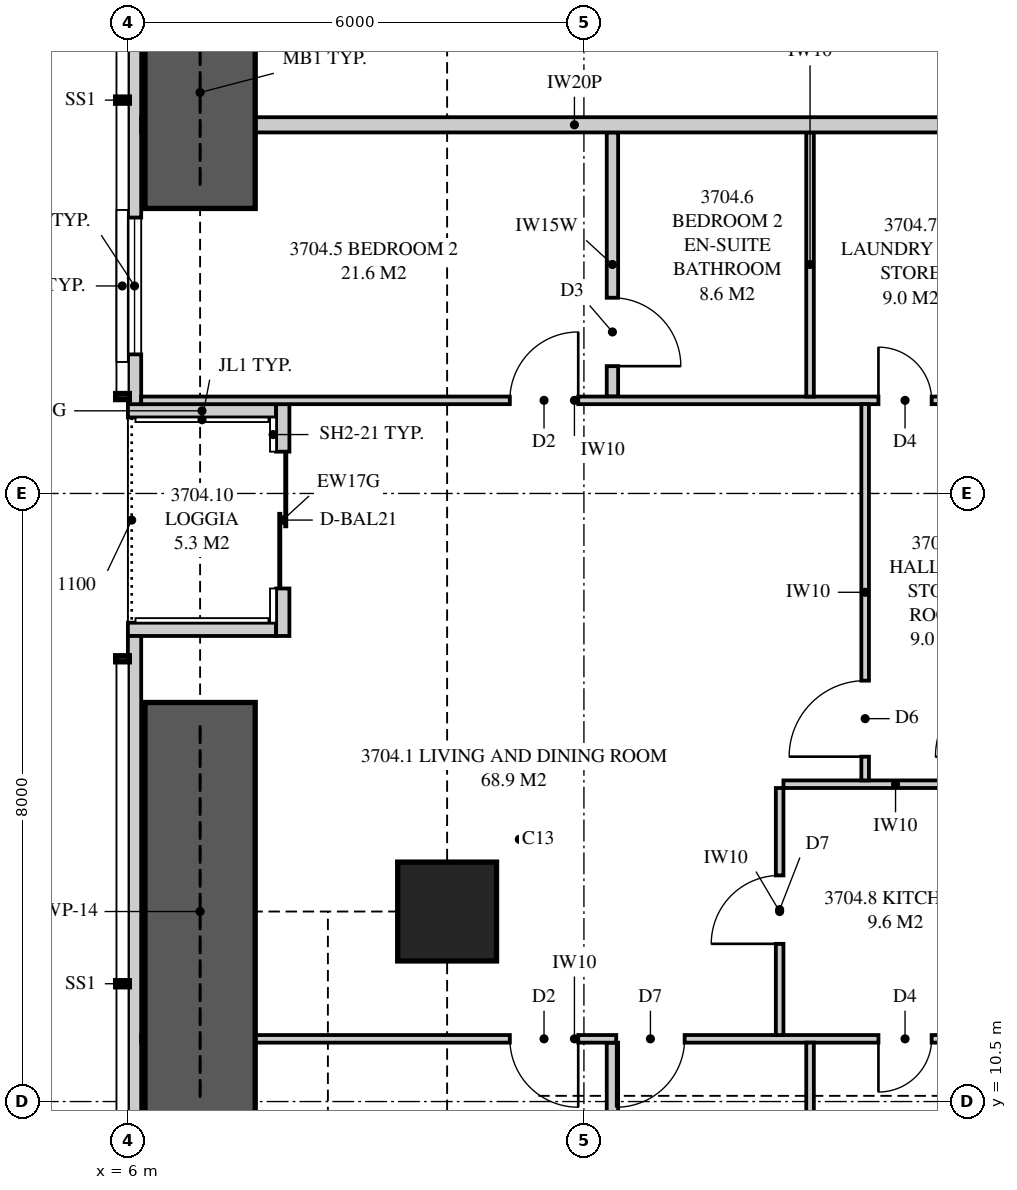
"""IFC4 building model, lengths in metres.
Left out: names, types, materials, properties, quantities, classifications, styles, units other than length and angle.
Written with IfcOpenShell. Run it as: python <this file> out.ifc"""

import sys

from ifc_helpers import new_model, si_unit, direction, frame, frame_2d, origin, origin_2d, place, context, subcontext, project, spatial, polyline, rectangle, outline, extrude, element, fill, save


model = new_model("IFC4")
c1 = context("Model", 3, precision=1e-05, world=origin(), true_north=direction((0.0, 1.0)))
c2 = subcontext(c1, "Body", "Model", "MODEL_VIEW")
j1 = project(units=[si_unit("LENGTHUNIT", "METRE"), si_unit("PLANEANGLEUNIT", "RADIAN")], contexts=[c1])
p1 = place(None, origin())
s1 = spatial("IfcSite", under=j1, at=p1, CompositionType="ELEMENT")
p2 = place(p1, origin())
s2 = spatial("IfcBuilding", under=s1, at=p2, CompositionType="ELEMENT")
p3 = place(p2, frame((0.0, 0.0, 135.0)))
s3 = spatial("IfcBuildingStorey", under=s2, at=p3, CompositionType="ELEMENT", Elevation=135.0)
p4 = place(p3, frame((10.2, 13.0, 0.0), z_axis=(0.0, 0.0, 1.0), x_axis=(1.0, 0.0, 0.0)))
e1 = element("IfcColumn", 1, at=p4, inside=s3, PredefinedType="COLUMN", context=c2, shape_type="SweptSolid", body=[
    extrude(rectangle(XDim=1.3, YDim=1.3, at=origin_2d()), origin(), (0.0, 0.0, 1.0), 3.35),
])
p5 = place(p3, frame((6.087, 34.949, 0.0), z_axis=(0.0, 0.0, 1.0), x_axis=(0.0, -1.0, 0.0)))
e2 = element("IfcWall", 2, at=p5, inside=s3, PredefinedType="SOLIDWALL", context=c2, shape_type="SweptSolid", body=[
    extrude(outline(polyline([(0.0, 0.0), (15.274, 0.0), (15.274, 2.15), (9.949, 2.15), (9.949, 3.11), (9.823, 3.11), (9.823, 2.15), (9.73, 2.15), (9.73, 3.11), (0.0, 3.11), (0.0, 0.0)])), frame((0.0, 0.087, 0.0), z_axis=(0.0, -1.0, 0.0), x_axis=(1.0, 0.0, 0.0)), (0.0, 0.0, 1.0), 0.175),
])
p6 = place(p5, frame((2.618, 0.0, 0.4)))
e3 = element("IfcOpeningElement", 3, at=p6, cuts=e2, PredefinedType="OPENING", context=c2, shape_type="SweptSolid", body=[
    extrude(rectangle(XDim=1.8, YDim=1.7, at=frame_2d((0.9, 0.85))), frame((0.0, 0.097, 0.0), z_axis=(0.0, -1.0, 0.0), x_axis=(1.0, 0.0, 0.0)), (0.0, 0.0, 1.0), 0.195),
])
p7 = place(p5, frame((5.874, 0.0, 0.4)))
e4 = element("IfcOpeningElement", 4, at=p7, cuts=e2, PredefinedType="OPENING", context=c2, shape_type="SweptSolid", body=[
    extrude(rectangle(XDim=1.2, YDim=1.7, at=frame_2d((0.6, 0.85))), frame((0.0, 0.097, 0.0), z_axis=(0.0, -1.0, 0.0), x_axis=(1.0, 0.0, 0.0)), (0.0, 0.0, 1.0), 0.195),
])
p8 = place(p5, frame((12.819, 0.0, 0.4)))
e5 = element("IfcOpeningElement", 5, at=p8, cuts=e2, PredefinedType="OPENING", context=c2, shape_type="SweptSolid", body=[
    extrude(rectangle(XDim=1.8, YDim=1.7, at=frame_2d((0.9, 0.85))), frame((0.0, 0.097, 0.0), z_axis=(0.0, -1.0, 0.0), x_axis=(1.0, 0.0, 0.0)), (0.0, 0.0, 1.0), 0.195),
])
p9 = place(p3, frame((6.087, 16.625, 0.0), z_axis=(0.0, 0.0, 1.0), x_axis=(0.0, -1.0, 0.0)))
e6 = element("IfcWall", 6, at=p9, inside=s3, PredefinedType="SOLIDWALL", context=c2, shape_type="SweptSolid", body=[
    extrude(outline(polyline([(0.0, 0.0), (13.574, 0.0), (13.574, 3.11), (3.844, 3.11), (3.844, 2.15), (3.751, 2.15), (3.751, 3.11), (3.625, 3.11), (3.625, 2.15), (0.0, 2.15), (0.0, 0.0)])), frame((0.0, 0.087, 0.0), z_axis=(0.0, -1.0, 0.0), x_axis=(1.0, 0.0, 0.0)), (0.0, 0.0, 1.0), 0.175),
])
p10 = place(p9, frame((6.5, 0.0, 0.4)))
e7 = element("IfcOpeningElement", 7, at=p10, cuts=e6, PredefinedType="OPENING", context=c2, shape_type="SweptSolid", body=[
    extrude(rectangle(XDim=1.8, YDim=1.7, at=frame_2d((0.9, 0.85))), frame((0.0, 0.097, 0.0), z_axis=(0.0, -1.0, 0.0), x_axis=(1.0, 0.0, 0.0)), (0.0, 0.0, 1.0), 0.195),
])
p11 = place(p9, frame((9.656, 0.0, 0.4)))
e8 = element("IfcOpeningElement", 8, at=p11, cuts=e6, PredefinedType="OPENING", context=c2, shape_type="SweptSolid", body=[
    extrude(rectangle(XDim=1.8, YDim=1.7, at=frame_2d((0.9, 0.85))), frame((0.0, 0.097, 0.0), z_axis=(0.0, -1.0, 0.0), x_axis=(1.0, 0.0, 0.0)), (0.0, 0.0, 1.0), 0.195),
])
p12 = place(p3, frame((8.038, 19.675, 0.0), z_axis=(0.0, 0.0, 1.0), x_axis=(0.0, -1.0, 0.0)))
e9 = element("IfcWall", 9, at=p12, inside=s3, PredefinedType="SOLIDWALL", context=c2, shape_type="SweptSolid", body=[
    extrude(rectangle(XDim=3.05, YDim=0.175, at=frame_2d((1.525, 0.0))), origin(), (0.0, 0.0, 1.0), 3.11),
])
p13 = place(p12, frame((0.625, 0.0, 0.0)))
e10 = element("IfcOpeningElement", 10, at=p13, cuts=e9, PredefinedType="OPENING", context=c2, shape_type="SweptSolid", body=[
    extrude(rectangle(XDim=1.8, YDim=2.1, at=frame_2d((0.9, 1.05))), frame((0.0, 0.097, 0.0), z_axis=(0.0, -1.0, 0.0), x_axis=(1.0, 0.0, 0.0)), (0.0, 0.0, 1.0), 0.195),
])
for number, where, z_axis, x_axis in (
    (11, (6.0, 19.587, 0.0), (0.0, 0.0, 1.0), (1.0, 0.0, 0.0)),
    (12, (6.0, 16.712, 0.0), (0.0, 0.0, 1.0), (1.0, 0.0, 0.0)),
):
    element("IfcWall", number, at=place(p3, frame(where, z_axis=z_axis, x_axis=x_axis)), inside=s3, PredefinedType="SOLIDWALL", context=c2, shape_type="SweptSolid", body=[
        extrude(outline(polyline([(0.0, 0.0), (1.95, 0.0), (1.95, 3.11), (1.75, 3.11), (1.75, 2.15), (0.15, 2.15), (0.15, 3.11), (0.0, 3.11), (0.0, 0.0)])), frame((0.0, 0.087, 0.0), z_axis=(0.0, -1.0, 0.0), x_axis=(1.0, 0.0, 0.0)), (0.0, 0.0, 1.0), 0.175),
    ])
p14 = place(p3, frame((6.175, 23.35, 0.0), z_axis=(0.0, 0.0, 1.0), x_axis=(1.0, 0.0, 0.0)))
e13 = element("IfcWall", 13, at=p14, inside=s3, PredefinedType="PARTITIONING", context=c2, shape_type="SweptSolid", body=[
    extrude(outline(polyline([(0.529, 2.15), (0.0, 2.15), (0.0, 0.0), (0.529, 0.0), (0.529, 0.376), (1.021, 0.376), (1.021, 0.0), (11.4, 0.0), (11.4, 3.11), (5.335, 3.11), (5.335, 2.51), (2.715, 2.51), (2.715, 3.11), (1.685, 3.11), (1.685, 2.15), (1.021, 2.15), (1.021, 1.774), (0.529, 1.774), (0.529, 2.15)])), frame((0.0, 0.1, 0.0), z_axis=(0.0, -1.0, 0.0), x_axis=(1.0, 0.0, 0.0)), (0.0, 0.0, 1.0), 0.2),
])
p15 = place(p3, frame((6.175, 11.325, 0.0), z_axis=(0.0, 0.0, 1.0), x_axis=(1.0, 0.0, 0.0)))
e14 = element("IfcWall", 14, at=p15, inside=s3, PredefinedType="PARTITIONING", context=c2, shape_type="SweptSolid", body=[
    extrude(outline(polyline([(0.175, 3.11), (0.0, 3.11), (0.0, 0.0), (0.529, 0.0), (0.529, 0.325), (1.021, 0.325), (1.021, 0.0), (11.4, 0.0), (11.4, 3.11), (5.285, 3.11), (5.285, 2.51), (2.765, 2.51), (2.765, 3.11), (2.744, 3.11), (2.744, 2.541), (2.169, 2.541), (2.169, 3.11), (1.918, 3.11), (1.918, 2.15), (1.021, 2.15), (1.021, 1.825), (0.529, 1.825), (0.529, 2.15), (0.175, 2.15), (0.175, 3.11)])), frame((0.0, 0.05, 0.0), z_axis=(0.0, -1.0, 0.0), x_axis=(1.0, 0.0, 0.0)), (0.0, 0.0, 1.0), 0.1),
])
p16 = place(p15, frame((4.85, 0.0, 0.0)))
e15 = element("IfcOpeningElement", 15, at=p16, cuts=e14, PredefinedType="OPENING", context=c2, shape_type="SweptSolid", body=[
    extrude(rectangle(XDim=0.9, YDim=2.1, at=frame_2d((0.45, 1.05))), frame((0.0, 0.06, 0.0), z_axis=(0.0, -1.0, 0.0), x_axis=(1.0, 0.0, 0.0)), (0.0, 0.0, 1.0), 0.12),
])
p17 = place(p15, frame((6.25, 0.0, 0.0)))
e16 = element("IfcOpeningElement", 16, at=p17, cuts=e14, PredefinedType="OPENING", context=c2, shape_type="SweptSolid", body=[
    extrude(rectangle(XDim=0.9, YDim=2.1, at=frame_2d((0.45, 1.05))), frame((0.0, 0.06, 0.0), z_axis=(0.0, -1.0, 0.0), x_axis=(1.0, 0.0, 0.0)), (0.0, 0.0, 1.0), 0.12),
])
p18 = place(p15, frame((9.7, 0.0, 0.0)))
e17 = element("IfcOpeningElement", 17, at=p18, cuts=e14, PredefinedType="OPENING", context=c2, shape_type="SweptSolid", body=[
    extrude(rectangle(XDim=0.7, YDim=2.1, at=frame_2d((0.35, 1.05))), frame((0.0, 0.06, 0.0), z_axis=(0.0, -1.0, 0.0), x_axis=(1.0, 0.0, 0.0)), (0.0, 0.0, 1.0), 0.12),
])
p19 = place(p3, frame((6.175, 19.725, 0.0), z_axis=(0.0, 0.0, 1.0), x_axis=(1.0, 0.0, 0.0)))
e18 = element("IfcWall", 18, at=p19, inside=s3, PredefinedType="PARTITIONING", context=c2, shape_type="SweptSolid", body=[
    extrude(outline(polyline([(0.0, 0.0), (11.4, 0.0), (11.4, 3.11), (5.285, 3.11), (5.285, 2.51), (2.765, 2.51), (2.765, 3.11), (1.635, 3.11), (1.635, 2.15), (0.0, 2.15), (0.0, 3.11), (0.0, 0.0)])), frame((0.0, 0.05, 0.0), z_axis=(0.0, -1.0, 0.0), x_axis=(1.0, 0.0, 0.0)), (0.0, 0.0, 1.0), 0.1),
])
p20 = place(p19, frame((4.85, 0.0, 0.0)))
e19 = element("IfcOpeningElement", 19, at=p20, cuts=e18, PredefinedType="OPENING", context=c2, shape_type="SweptSolid", body=[
    extrude(rectangle(XDim=0.9, YDim=2.1, at=frame_2d((0.45, 1.05))), frame((0.0, 0.06, 0.0), z_axis=(0.0, -1.0, 0.0), x_axis=(1.0, 0.0, 0.0)), (0.0, 0.0, 1.0), 0.12),
])
p21 = place(p19, frame((9.7, 0.0, 0.0)))
e20 = element("IfcOpeningElement", 20, at=p21, cuts=e18, PredefinedType="OPENING", context=c2, shape_type="SweptSolid", body=[
    extrude(rectangle(XDim=0.7, YDim=2.1, at=frame_2d((0.35, 1.05))), frame((0.0, 0.06, 0.0), z_axis=(0.0, -1.0, 0.0), x_axis=(1.0, 0.0, 0.0)), (0.0, 0.0, 1.0), 0.12),
])
p22 = place(p3, frame((12.375, 7.825, 0.0), z_axis=(0.0, 0.0, 1.0), x_axis=(0.0, 1.0, 0.0)))
e21 = element("IfcWall", 21, at=p22, inside=s3, PredefinedType="PLUMBINGWALL", context=c2, shape_type="SweptSolid", body=[
    extrude(outline(polyline([(0.0, 0.0), (3.45, 0.0), (3.45, 3.11), (3.062, 3.11), (3.062, 2.541), (2.438, 2.541), (2.438, 3.11), (0.0, 3.11), (0.0, 0.0)])), frame((0.0, 0.075, 0.0), z_axis=(0.0, -1.0, 0.0), x_axis=(1.0, 0.0, 0.0)), (0.0, 0.0, 1.0), 0.15),
])
p23 = place(p3, frame((14.975, 7.825, 0.0), z_axis=(0.0, 0.0, 1.0), x_axis=(0.0, 1.0, 0.0)))
e22 = element("IfcWall", 22, at=p23, inside=s3, PredefinedType="PARTITIONING", context=c2, shape_type="SweptSolid", body=[
    extrude(outline(polyline([(0.0, 0.0), (3.45, 0.0), (3.45, 3.11), (3.037, 3.11), (3.037, 2.541), (2.463, 2.541), (2.463, 3.11), (0.0, 3.11), (0.0, 0.0)])), frame((0.0, 0.05, 0.0), z_axis=(0.0, -1.0, 0.0), x_axis=(1.0, 0.0, 0.0)), (0.0, 0.0, 1.0), 0.1),
])
p24 = place(p3, frame((12.375, 19.775, 0.0), z_axis=(0.0, 0.0, 1.0), x_axis=(0.0, 1.0, 0.0)))
e23 = element("IfcWall", 23, at=p24, inside=s3, PredefinedType="PLUMBINGWALL", context=c2, shape_type="SweptSolid", body=[
    extrude(rectangle(XDim=3.475, YDim=0.15, at=frame_2d((1.738, 0.0))), origin(), (0.0, 0.0, 1.0), 3.11),
])
p25 = place(p24, frame((0.4, 0.0, 0.0)))
e24 = element("IfcOpeningElement", 24, at=p25, cuts=e23, PredefinedType="OPENING", context=c2, shape_type="SweptSolid", body=[
    extrude(rectangle(XDim=0.9, YDim=2.1, at=frame_2d((0.45, 1.05))), frame((0.0, 0.085, 0.0), z_axis=(0.0, -1.0, 0.0), x_axis=(1.0, 0.0, 0.0)), (0.0, 0.0, 1.0), 0.17),
])
p26 = place(p3, frame((14.975, 19.775, 0.0), z_axis=(0.0, 0.0, 1.0), x_axis=(0.0, 1.0, 0.0)))
e25 = element("IfcWall", 25, at=p26, inside=s3, PredefinedType="PARTITIONING", context=c2, shape_type="SweptSolid", body=[
    extrude(rectangle(XDim=3.475, YDim=0.1, at=frame_2d((1.738, 0.0))), origin(), (0.0, 0.0, 1.0), 3.11),
])
p27 = place(p3, frame((14.575, 11.375, 0.0), z_axis=(0.0, 0.0, 1.0), x_axis=(0.0, 1.0, 0.0)))
e26 = element("IfcWall", 26, at=p27, inside=s3, PredefinedType="PARTITIONING", context=c2, shape_type="SweptSolid", body=[
    extrude(rectangle(XDim=3.25, YDim=0.1, at=frame_2d((1.625, 0.0))), origin(), (0.0, 0.0, 1.0), 3.11),
])
p28 = place(p27, frame((1.2, 0.0, 0.0)))
e27 = element("IfcOpeningElement", 27, at=p28, cuts=e26, PredefinedType="OPENING", context=c2, shape_type="SweptSolid", body=[
    extrude(rectangle(XDim=0.9, YDim=2.1, at=frame_2d((0.45, 1.05))), frame((0.0, 0.06, 0.0), z_axis=(0.0, -1.0, 0.0), x_axis=(1.0, 0.0, 0.0)), (0.0, 0.0, 1.0), 0.12),
])
p29 = place(p3, frame((14.625, 14.675, 0.0), z_axis=(0.0, 0.0, 1.0), x_axis=(1.0, 0.0, 0.0)))
e28 = element("IfcWall", 28, at=p29, inside=s3, PredefinedType="PARTITIONING", context=c2, shape_type="SweptSolid", body=[
    extrude(rectangle(XDim=2.95, YDim=0.1, at=frame_2d((1.475, 0.0))), origin(), (0.0, 0.0, 1.0), 3.11),
])
p30 = place(p3, frame((15.7, 14.725, 0.0), z_axis=(0.0, 0.0, 1.0), x_axis=(0.0, 1.0, 0.0)))
e29 = element("IfcWall", 29, at=p30, inside=s3, PredefinedType="PARTITIONING", context=c2, shape_type="SweptSolid", body=[
    extrude(rectangle(XDim=4.95, YDim=0.1, at=frame_2d((2.475, 0.0))), origin(), (0.0, 0.0, 1.0), 3.11),
])
p31 = place(p30, frame((0.312, 0.0, 0.0)))
e30 = element("IfcOpeningElement", 30, at=p31, cuts=e29, PredefinedType="OPENING", context=c2, shape_type="SweptSolid", body=[
    extrude(rectangle(XDim=1.0, YDim=2.1, at=frame_2d((0.5, 1.05))), frame((0.0, 0.06, 0.0), z_axis=(0.0, -1.0, 0.0), x_axis=(1.0, 0.0, 0.0)), (0.0, 0.0, 1.0), 0.12),
])
for number, where, z_axis, x_axis in (
    (31, (6.95, 22.25, 0.0), (0.0, 0.0, 1.0), (0.0, 1.0, 0.0)),
    (32, (6.95, 10.25, 0.0), (0.0, 0.0, 1.0), (0.0, 1.0, 0.0)),
):
    element("IfcWall", number, at=place(p3, frame(where, z_axis=z_axis, x_axis=x_axis)), inside=s3, PredefinedType="SHEAR", context=c2, shape_type="SweptSolid", body=[
        extrude(rectangle(XDim=5.5, YDim=1.45, at=frame_2d((2.75, 0.0))), origin(), (0.0, 0.0, 1.0), 3.35),
    ])
p32 = place(p8, origin())
e33 = element("IfcWindow", 33, at=p32, inside=s3, PartitioningType="SINGLE_PANEL", PredefinedType="WINDOW", context=c2, shape_type="SweptSolid", body=[
    extrude(rectangle(XDim=1.8, YDim=1.7, at=frame_2d((0.9, 0.85))), frame((0.0, 0.03, 0.0), z_axis=(0.0, -1.0, 0.0), x_axis=(1.0, 0.0, 0.0)), (0.0, 0.0, 1.0), 0.06),
])
fill(e5, e33)
p33 = place(p13, origin())
e34 = element("IfcDoor", 34, at=p33, inside=s3, OperationType="SLIDING_TO_LEFT", PredefinedType="DOOR", context=c2, shape_type="SweptSolid", body=[
    extrude(rectangle(XDim=1.8, YDim=2.1, at=frame_2d((0.9, 1.05))), frame((0.0, 0.025, 0.0), z_axis=(0.0, -1.0, 0.0), x_axis=(1.0, 0.0, 0.0)), (0.0, 0.0, 1.0), 0.05),
])
fill(e10, e34)
p34 = place(p16, frame((0.9, 0.0, 0.0), z_axis=(0.0, 0.0, 1.0), x_axis=(-1.0, 0.0, 0.0)))
e35 = element("IfcDoor", 35, at=p34, inside=s3, OperationType="SINGLE_SWING_LEFT", PredefinedType="DOOR", context=c2, shape_type="SweptSolid", body=[
    extrude(rectangle(XDim=0.9, YDim=2.1, at=frame_2d((0.45, 1.05))), frame((0.0, 0.025, 0.0), z_axis=(0.0, -1.0, 0.0), x_axis=(1.0, 0.0, 0.0)), (0.0, 0.0, 1.0), 0.05),
])
fill(e15, e35)
p35 = place(p17, frame((0.9, 0.0, 0.0), z_axis=(0.0, 0.0, 1.0), x_axis=(-1.0, 0.0, 0.0)))
e36 = element("IfcDoor", 36, at=p35, inside=s3, OperationType="SINGLE_SWING_RIGHT", PredefinedType="DOOR", context=c2, shape_type="SweptSolid", body=[
    extrude(rectangle(XDim=0.9, YDim=2.1, at=frame_2d((0.45, 1.05))), frame((0.0, 0.025, 0.0), z_axis=(0.0, -1.0, 0.0), x_axis=(1.0, 0.0, 0.0)), (0.0, 0.0, 1.0), 0.05),
])
fill(e16, e36)
p36 = place(p18, frame((0.7, 0.0, 0.0), z_axis=(0.0, 0.0, 1.0), x_axis=(-1.0, 0.0, 0.0)))
e37 = element("IfcDoor", 37, at=p36, inside=s3, OperationType="SINGLE_SWING_RIGHT", PredefinedType="DOOR", context=c2, shape_type="SweptSolid", body=[
    extrude(rectangle(XDim=0.7, YDim=2.1, at=frame_2d((0.35, 1.05))), frame((0.0, 0.025, 0.0), z_axis=(0.0, -1.0, 0.0), x_axis=(1.0, 0.0, 0.0)), (0.0, 0.0, 1.0), 0.05),
])
fill(e17, e37)
p37 = place(p20, origin())
e38 = element("IfcDoor", 38, at=p37, inside=s3, OperationType="SINGLE_SWING_RIGHT", PredefinedType="DOOR", context=c2, shape_type="SweptSolid", body=[
    extrude(rectangle(XDim=0.9, YDim=2.1, at=frame_2d((0.45, 1.05))), frame((0.0, 0.025, 0.0), z_axis=(0.0, -1.0, 0.0), x_axis=(1.0, 0.0, 0.0)), (0.0, 0.0, 1.0), 0.05),
])
fill(e19, e38)
p38 = place(p25, frame((0.9, 0.0, 0.0), z_axis=(0.0, 0.0, 1.0), x_axis=(-1.0, 0.0, 0.0)))
e39 = element("IfcDoor", 39, at=p38, inside=s3, OperationType="SINGLE_SWING_RIGHT", PredefinedType="DOOR", context=c2, shape_type="SweptSolid", body=[
    extrude(rectangle(XDim=0.9, YDim=2.1, at=frame_2d((0.45, 1.05))), frame((0.0, 0.025, 0.0), z_axis=(0.0, -1.0, 0.0), x_axis=(1.0, 0.0, 0.0)), (0.0, 0.0, 1.0), 0.05),
])
fill(e24, e39)
p39 = place(p21, origin())
e40 = element("IfcDoor", 40, at=p39, inside=s3, OperationType="SINGLE_SWING_LEFT", PredefinedType="DOOR", context=c2, shape_type="SweptSolid", body=[
    extrude(rectangle(XDim=0.7, YDim=2.1, at=frame_2d((0.35, 1.05))), frame((0.0, 0.025, 0.0), z_axis=(0.0, -1.0, 0.0), x_axis=(1.0, 0.0, 0.0)), (0.0, 0.0, 1.0), 0.05),
])
fill(e20, e40)
p40 = place(p28, origin())
e41 = element("IfcDoor", 41, at=p40, inside=s3, OperationType="SINGLE_SWING_LEFT", PredefinedType="DOOR", context=c2, shape_type="SweptSolid", body=[
    extrude(rectangle(XDim=0.9, YDim=2.1, at=frame_2d((0.45, 1.05))), frame((0.0, 0.025, 0.0), z_axis=(0.0, -1.0, 0.0), x_axis=(1.0, 0.0, 0.0)), (0.0, 0.0, 1.0), 0.05),
])
fill(e27, e41)
p41 = place(p31, origin())
e42 = element("IfcDoor", 42, at=p41, inside=s3, OperationType="SINGLE_SWING_LEFT", PredefinedType="DOOR", context=c2, shape_type="SweptSolid", body=[
    extrude(rectangle(XDim=1.0, YDim=2.1, at=frame_2d((0.5, 1.05))), frame((0.0, 0.025, 0.0), z_axis=(0.0, -1.0, 0.0), x_axis=(1.0, 0.0, 0.0)), (0.0, 0.0, 1.0), 0.05),
])
fill(e30, e42)
save(model, sys.argv[1])
